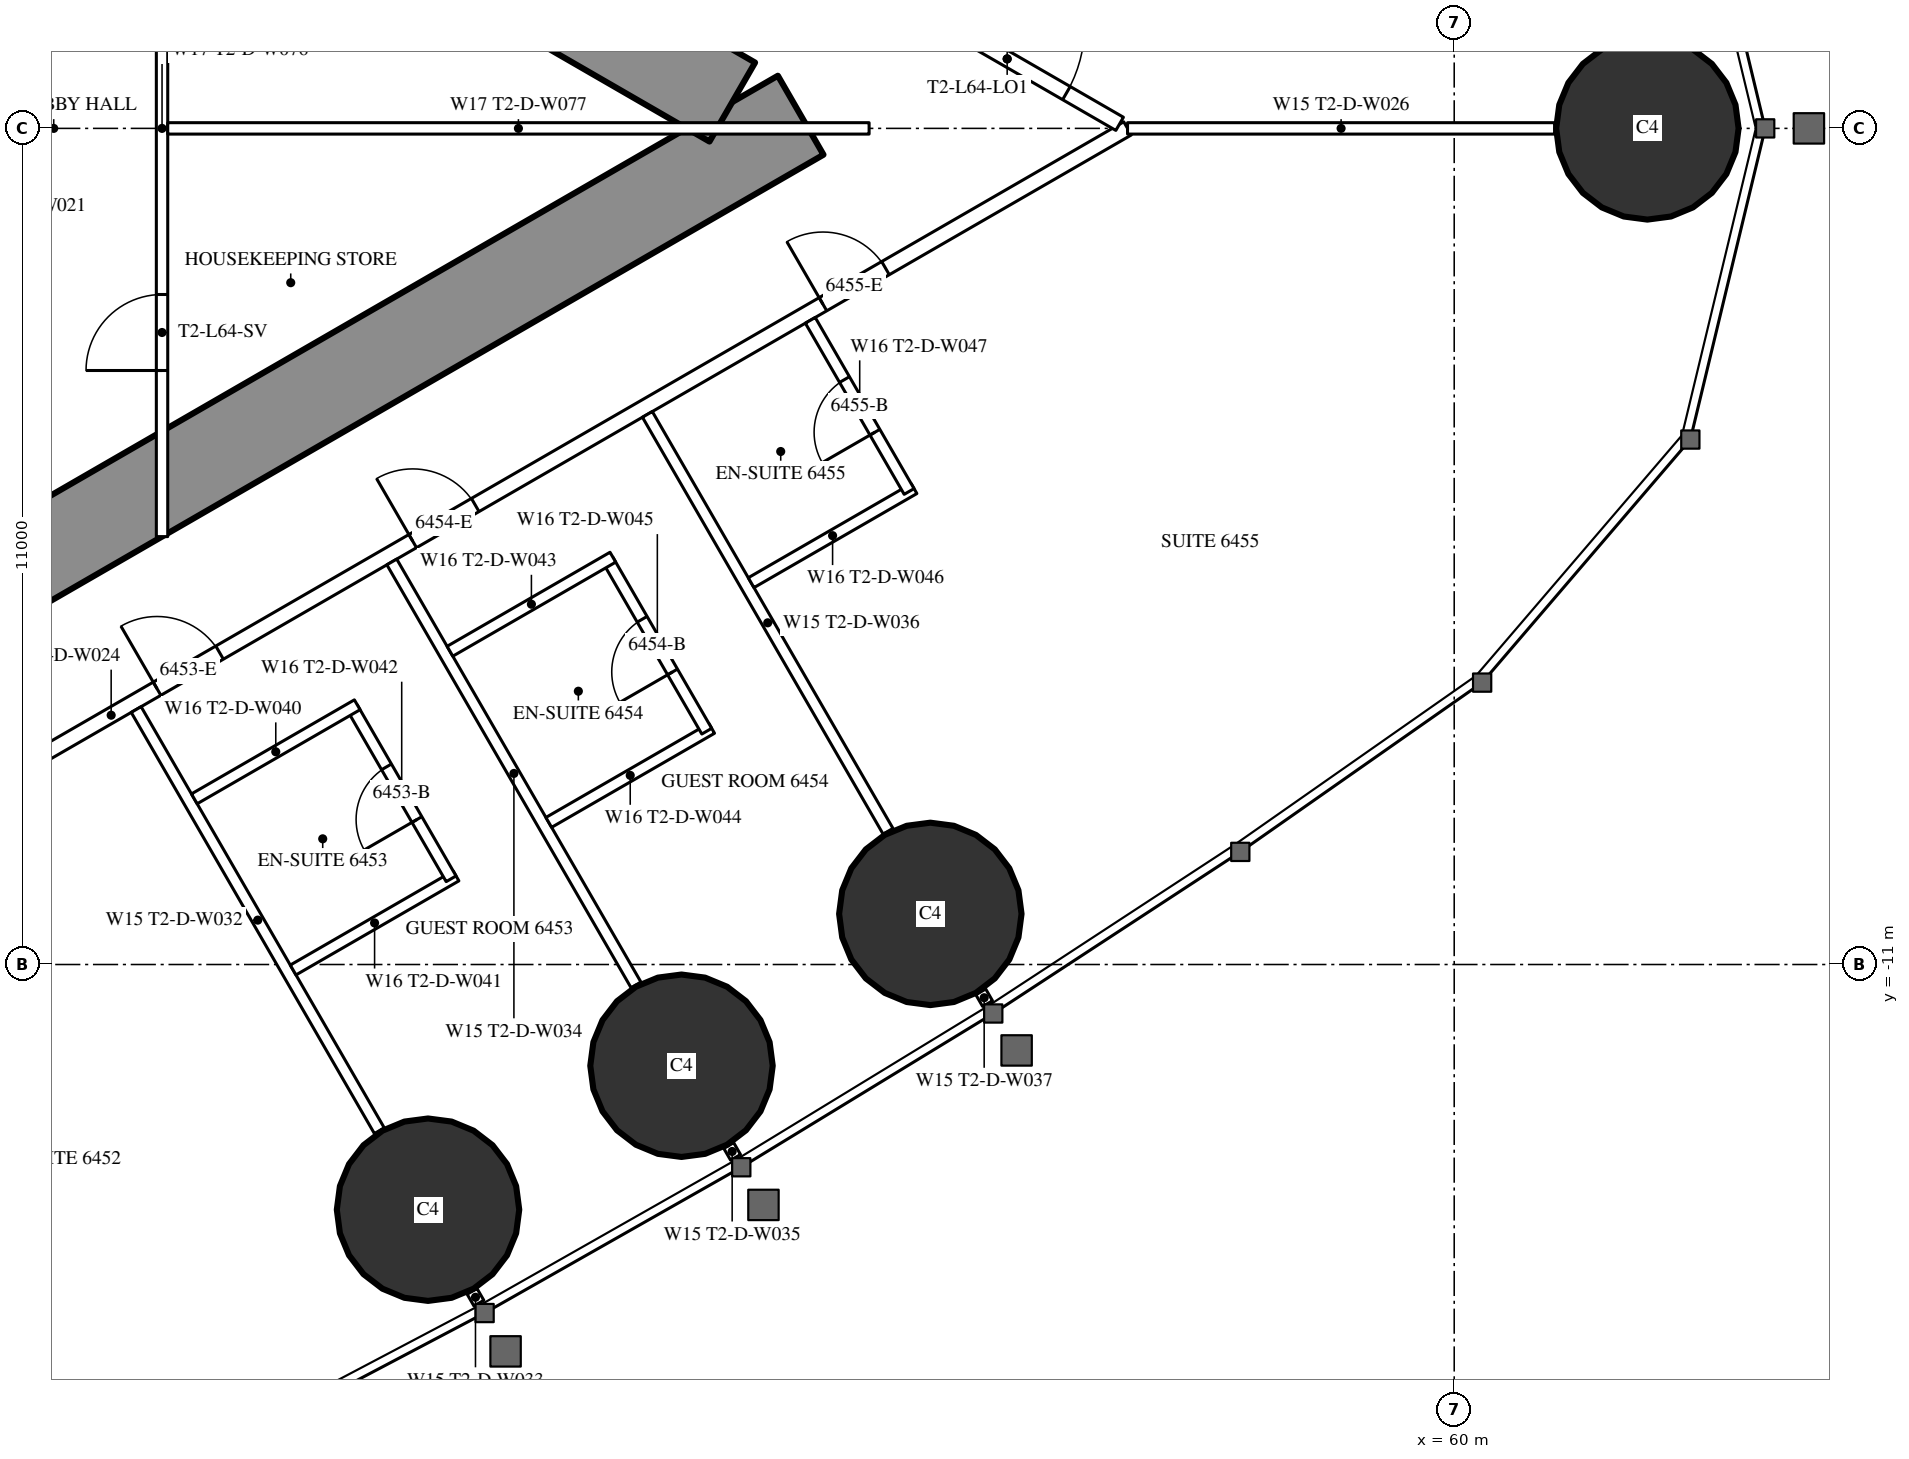
"""IFC4 building model, lengths in metres.
Left out: names, types, materials, properties, quantities, classifications, styles, units other than length and angle.
Written with IfcOpenShell. Run it as: python <this file> out.ifc"""

import sys

from ifc_helpers import new_model, si_unit, direction, frame, frame_2d, origin, origin_2d, place, context, subcontext, project, spatial, rectangle, circle, extrude, element, fill, save


model = new_model("IFC4")
c1 = context("Model", 3, precision=1e-05, world=origin(), true_north=direction((0.0, 1.0)))
c2 = subcontext(c1, "Body", "Model", "MODEL_VIEW")
j1 = project(units=[si_unit("LENGTHUNIT", "METRE"), si_unit("PLANEANGLEUNIT", "RADIAN")], contexts=[c1])
p1 = place(None, origin())
s1 = spatial("IfcSite", under=j1, at=p1, CompositionType="ELEMENT")
p2 = place(p1, origin())
s2 = spatial("IfcBuilding", under=s1, at=p2, CompositionType="ELEMENT")
p3 = place(p2, frame((0.0, 0.0, 240.5)))
s3 = spatial("IfcBuildingStorey", under=s2, at=p3, CompositionType="ELEMENT", Elevation=240.5)
for number, where, z_axis, x_axis in (
    (1, (62.542, 0.0, 0.0), (0.0, 0.0, 1.0), (1.0, 0.0, 0.0)),
    (2, (46.499, -14.226, 0.0), (0.0, 0.0, 1.0), (1.0, 0.0, 0.0)),
    (3, (49.834, -12.332, 0.0), (0.0, 0.0, 1.0), (1.0, 0.0, 0.0)),
    (4, (53.108, -10.334, 0.0), (0.0, 0.0, 1.0), (1.0, 0.0, 0.0)),
):
    element("IfcColumn", number, at=place(p3, frame(where, z_axis=z_axis, x_axis=x_axis)), inside=s3, PredefinedType="COLUMN", context=c2, shape_type="SweptSolid", body=[
        extrude(circle(Radius=1.2, at=origin_2d()), origin(), (0.0, 0.0, 1.0), 3.6),
    ])
p4 = place(p3, frame((27.2, -13.8, 0.0), z_axis=(0.0, 0.0, 1.0), x_axis=(0.866027159892, 0.499996958321, 0.0)))
e5 = element("IfcWall", 5, at=p4, inside=s3, PredefinedType="SHEAR", context=c2, shape_type="SweptSolid", body=[
    extrude(rectangle(XDim=27.947, YDim=1.2, at=frame_2d((13.973, 0.0))), origin(), (0.0, 0.0, 1.0), 3.6),
])
p5 = place(p4, frame((4.6, 0.0, 0.0)))
e6 = element("IfcOpeningElement", 6, at=p5, cuts=e5, PredefinedType="OPENING", context=c2, shape_type="SweptSolid", body=[
    extrude(rectangle(XDim=1.0, YDim=2.2, at=frame_2d((0.5, 1.1))), frame((0.0, 0.61, 0.0), z_axis=(0.0, -1.0, 0.0), x_axis=(1.0, 0.0, 0.0)), (0.0, 0.0, 1.0), 1.22),
])
p6 = place(p4, frame((13.395, 0.0, 0.0)))
e7 = element("IfcOpeningElement", 7, at=p6, cuts=e5, PredefinedType="OPENING", context=c2, shape_type="SweptSolid", body=[
    extrude(rectangle(XDim=1.8, YDim=2.2, at=frame_2d((0.9, 1.1))), frame((0.0, 0.61, 0.0), z_axis=(0.0, -1.0, 0.0), x_axis=(1.0, 0.0, 0.0)), (0.0, 0.0, 1.0), 1.22),
])
p7 = place(p3, frame((27.2, 13.8, 0.0), z_axis=(0.0, 0.0, 1.0), x_axis=(0.866024515034, -0.500001539357, 0.0)))
e8 = element("IfcWall", 8, at=p7, inside=s3, PredefinedType="SHEAR", context=c2, shape_type="SweptSolid", body=[
    extrude(rectangle(XDim=26.907, YDim=1.2, at=frame_2d((13.454, 0.0))), origin(), (0.0, 0.0, 1.0), 3.6),
])
p8 = place(p7, frame((4.6, 0.0, 0.0)))
e9 = element("IfcOpeningElement", 9, at=p8, cuts=e8, PredefinedType="OPENING", context=c2, shape_type="SweptSolid", body=[
    extrude(rectangle(XDim=1.0, YDim=2.2, at=frame_2d((0.5, 1.1))), frame((0.0, 0.61, 0.0), z_axis=(0.0, -1.0, 0.0), x_axis=(1.0, 0.0, 0.0)), (0.0, 0.0, 1.0), 1.22),
])
p9 = place(p7, frame((13.395, 0.0, 0.0)))
e10 = element("IfcOpeningElement", 10, at=p9, cuts=e8, PredefinedType="OPENING", context=c2, shape_type="SweptSolid", body=[
    extrude(rectangle(XDim=1.8, YDim=2.2, at=frame_2d((0.9, 1.1))), frame((0.0, 0.61, 0.0), z_axis=(0.0, -1.0, 0.0), x_axis=(1.0, 0.0, 0.0)), (0.0, 0.0, 1.0), 1.22),
])
p10 = place(p3, frame((28.959, -15.44, 0.0), z_axis=(0.0, 0.0, 1.0), x_axis=(0.866025227435, 0.500000305447, 0.0)))
e11 = element("IfcWall", 11, at=p10, inside=s3, PredefinedType="PARTITIONING", context=c2, shape_type="SweptSolid", body=[
    extrude(rectangle(XDim=30.88, YDim=0.2, at=frame_2d((15.44, 0.0))), origin(), (0.0, 0.0, 1.0), 3.35),
])
p11 = place(p10, frame((1.494, 0.0, 0.0)))
e12 = element("IfcOpeningElement", 12, at=p11, cuts=e11, PredefinedType="OPENING", context=c2, shape_type="SweptSolid", body=[
    extrude(rectangle(XDim=1.8, YDim=2.03, at=frame_2d((0.9, 1.015))), frame((0.0, 0.11, 0.0), z_axis=(0.0, -1.0, 0.0), x_axis=(1.0, 0.0, 0.0)), (0.0, 0.0, 1.0), 0.22),
])
p12 = place(p10, frame((7.687, 0.0, 0.0)))
e13 = element("IfcOpeningElement", 13, at=p12, cuts=e11, PredefinedType="OPENING", context=c2, shape_type="SweptSolid", body=[
    extrude(rectangle(XDim=1.0, YDim=2.2, at=frame_2d((0.5, 1.1))), frame((0.0, 0.11, 0.0), z_axis=(0.0, -1.0, 0.0), x_axis=(1.0, 0.0, 0.0)), (0.0, 0.0, 1.0), 0.22),
])
p13 = place(p10, frame((16.137, 0.0, 0.0)))
e14 = element("IfcOpeningElement", 14, at=p13, cuts=e11, PredefinedType="OPENING", context=c2, shape_type="SweptSolid", body=[
    extrude(rectangle(XDim=0.95, YDim=2.2, at=frame_2d((0.475, 1.1))), frame((0.0, 0.11, 0.0), z_axis=(0.0, -1.0, 0.0), x_axis=(1.0, 0.0, 0.0)), (0.0, 0.0, 1.0), 0.22),
])
p14 = place(p10, frame((20.021, 0.0, 0.0)))
e15 = element("IfcOpeningElement", 15, at=p14, cuts=e11, PredefinedType="OPENING", context=c2, shape_type="SweptSolid", body=[
    extrude(rectangle(XDim=0.95, YDim=2.2, at=frame_2d((0.475, 1.1))), frame((0.0, 0.11, 0.0), z_axis=(0.0, -1.0, 0.0), x_axis=(1.0, 0.0, 0.0)), (0.0, 0.0, 1.0), 0.22),
])
p15 = place(p10, frame((26.253, 0.0, 0.0)))
e16 = element("IfcOpeningElement", 16, at=p15, cuts=e11, PredefinedType="OPENING", context=c2, shape_type="SweptSolid", body=[
    extrude(rectangle(XDim=0.95, YDim=2.2, at=frame_2d((0.475, 1.1))), frame((0.0, 0.11, 0.0), z_axis=(0.0, -1.0, 0.0), x_axis=(1.0, 0.0, 0.0)), (0.0, 0.0, 1.0), 0.22),
])
p16 = place(p3, frame((42.66, -7.646, 0.0), z_axis=(0.0, 0.0, 1.0), x_axis=(0.499996592859, -0.866027370889, 0.0)))
e17 = element("IfcWall", 17, at=p16, inside=s3, PredefinedType="PARTITIONING", context=c2, shape_type="SweptSolid", body=[
    extrude(rectangle(XDim=6.398, YDim=0.15, at=frame_2d((3.199, 0.0))), origin(), (0.0, 0.0, 1.0), 2.45),
])
p17 = place(p3, frame((47.079, -15.3, 0.0), z_axis=(0.0, 0.0, 1.0), x_axis=(0.499212083968, -0.866479829667, 0.0)))
e18 = element("IfcWall", 18, at=p17, inside=s3, PredefinedType="PARTITIONING", context=c2, shape_type="SweptSolid", body=[
    extrude(rectangle(XDim=0.179, YDim=0.15, at=frame_2d((0.09, 0.0))), origin(), (0.0, 0.0, 1.0), 2.45),
])
p18 = place(p3, frame((46.023, -5.704, 0.0), z_axis=(0.0, 0.0, 1.0), x_axis=(0.499984478165, -0.866034365135, 0.0)))
e19 = element("IfcWall", 19, at=p18, inside=s3, PredefinedType="PARTITIONING", context=c2, shape_type="SweptSolid", body=[
    extrude(rectangle(XDim=6.426, YDim=0.15, at=frame_2d((3.213, 0.0))), origin(), (0.0, 0.0, 1.0), 2.45),
])
p19 = place(p3, frame((50.456, -13.382, 0.0), z_axis=(0.0, 0.0, 1.0), x_axis=(0.500661834965, -0.865642955848, 0.0)))
e20 = element("IfcWall", 20, at=p19, inside=s3, PredefinedType="PARTITIONING", context=c2, shape_type="SweptSolid", body=[
    extrude(rectangle(XDim=0.18, YDim=0.15, at=frame_2d((0.09, 0.0))), origin(), (0.0, 0.0, 1.0), 2.45),
])
p20 = place(p3, frame((49.385, -3.763, 0.0), z_axis=(0.0, 0.0, 1.0), x_axis=(0.499999447814, -0.866025722589, 0.0)))
e21 = element("IfcWall", 21, at=p20, inside=s3, PredefinedType="PARTITIONING", context=c2, shape_type="SweptSolid", body=[
    extrude(rectangle(XDim=6.333, YDim=0.15, at=frame_2d((3.166, 0.0))), origin(), (0.0, 0.0, 1.0), 2.45),
])
p21 = place(p3, frame((53.771, -11.36, 0.0), z_axis=(0.0, 0.0, 1.0), x_axis=(0.499524978789, -0.866299483762, 0.0)))
e22 = element("IfcWall", 22, at=p21, inside=s3, PredefinedType="PARTITIONING", context=c2, shape_type="SweptSolid", body=[
    extrude(rectangle(XDim=0.178, YDim=0.15, at=frame_2d((0.089, 0.0))), origin(), (0.0, 0.0, 1.0), 2.45),
])
p22 = place(p3, frame((55.702, 0.0, 0.0), z_axis=(0.0, 0.0, 1.0), x_axis=(1.0, 0.0, 0.0)))
e23 = element("IfcWall", 23, at=p22, inside=s3, PredefinedType="PARTITIONING", context=c2, shape_type="SweptSolid", body=[
    extrude(rectangle(XDim=5.619, YDim=0.15, at=frame_2d((2.81, 0.0))), origin(), (0.0, 0.0, 1.0), 2.45),
])
p23 = place(p3, frame((52.639, 1.769, 0.0), z_axis=(0.0, 0.0, 1.0), x_axis=(0.866027340901, -0.4999966448, 0.0)))
e24 = element("IfcWall", 24, at=p23, inside=s3, PredefinedType="PARTITIONING", context=c2, shape_type="SweptSolid", body=[
    extrude(rectangle(XDim=3.417, YDim=0.2, at=frame_2d((1.708, 0.0))), origin(), (0.0, 0.0, 1.0), 3.35),
])
p24 = place(p23, frame((0.809, 0.0, 0.0)))
e25 = element("IfcOpeningElement", 25, at=p24, cuts=e24, PredefinedType="OPENING", context=c2, shape_type="SweptSolid", body=[
    extrude(rectangle(XDim=1.8, YDim=2.2, at=frame_2d((0.9, 1.1))), frame((0.0, 0.11, 0.0), z_axis=(0.0, -1.0, 0.0), x_axis=(1.0, 0.0, 0.0)), (0.0, 0.0, 1.0), 0.22),
])
p25 = place(p3, frame((44.725, -11.072, 0.0), z_axis=(0.0, 0.0, 1.0), x_axis=(0.866006523861, 0.500032699561, 0.0)))
e26 = element("IfcWall", 26, at=p25, inside=s3, PredefinedType="PARTITIONING", context=c2, shape_type="SweptSolid", body=[
    extrude(rectangle(XDim=2.475, YDim=0.15, at=frame_2d((1.237, 0.0))), origin(), (0.0, 0.0, 1.0), 3.35),
])
p26 = place(p3, frame((45.503, -7.621, 0.0), z_axis=(0.0, 0.0, 1.0), x_axis=(0.500006934395, -0.866021400173, 0.0)))
e27 = element("IfcWall", 27, at=p26, inside=s3, PredefinedType="PARTITIONING", context=c2, shape_type="SweptSolid", body=[
    extrude(rectangle(XDim=2.6, YDim=0.15, at=frame_2d((1.3, 0.0))), origin(), (0.0, 0.0, 1.0), 3.35),
])
p27 = place(p26, frame((0.9, 0.0, 0.0)))
e28 = element("IfcOpeningElement", 28, at=p27, cuts=e27, PredefinedType="OPENING", context=c2, shape_type="SweptSolid", body=[
    extrude(rectangle(XDim=0.8, YDim=2.2, at=frame_2d((0.4, 1.1))), frame((0.0, 0.085, 0.0), z_axis=(0.0, -1.0, 0.0), x_axis=(1.0, 0.0, 0.0)), (0.0, 0.0, 1.0), 0.17),
])
for number, where, z_axis, x_axis in (
    (29, (43.425, -8.821, 0.0), (0.0, 0.0, 1.0), (0.866, 0.5, 0.0)),
    (30, (48.088, -9.13, 0.0), (0.0, 0.0, 1.0), (0.866, 0.5, 0.0)),
):
    element("IfcWall", number, at=place(p3, frame(where, z_axis=z_axis, x_axis=x_axis)), inside=s3, PredefinedType="PARTITIONING", context=c2, shape_type="SweptSolid", body=[
        extrude(rectangle(XDim=2.475, YDim=0.15, at=frame_2d((1.237, 0.0))), origin(), (0.0, 0.0, 1.0), 3.35),
    ])
p28 = place(p3, frame((48.866, -5.679, 0.0), z_axis=(0.0, 0.0, 1.0), x_axis=(0.500006934395, -0.866021400173, 0.0)))
e31 = element("IfcWall", 31, at=p28, inside=s3, PredefinedType="PARTITIONING", context=c2, shape_type="SweptSolid", body=[
    extrude(rectangle(XDim=2.6, YDim=0.15, at=frame_2d((1.3, 0.0))), origin(), (0.0, 0.0, 1.0), 3.35),
])
p29 = place(p28, frame((0.9, 0.0, 0.0)))
e32 = element("IfcOpeningElement", 32, at=p29, cuts=e31, PredefinedType="OPENING", context=c2, shape_type="SweptSolid", body=[
    extrude(rectangle(XDim=0.8, YDim=2.2, at=frame_2d((0.4, 1.1))), frame((0.0, 0.085, 0.0), z_axis=(0.0, -1.0, 0.0), x_axis=(1.0, 0.0, 0.0)), (0.0, 0.0, 1.0), 0.17),
])
p30 = place(p3, frame((46.788, -6.879, 0.0), z_axis=(0.0, 0.0, 1.0), x_axis=(0.866006523861, 0.500032699561, 0.0)))
e33 = element("IfcWall", 33, at=p30, inside=s3, PredefinedType="PARTITIONING", context=c2, shape_type="SweptSolid", body=[
    extrude(rectangle(XDim=2.475, YDim=0.15, at=frame_2d((1.237, 0.0))), origin(), (0.0, 0.0, 1.0), 3.35),
])
p31 = place(p3, frame((50.75, -5.977, 0.0), z_axis=(0.0, 0.0, 1.0), x_axis=(0.866031185235, 0.4999899861, 0.0)))
e34 = element("IfcWall", 34, at=p31, inside=s3, PredefinedType="PARTITIONING", context=c2, shape_type="SweptSolid", body=[
    extrude(rectangle(XDim=2.475, YDim=0.15, at=frame_2d((1.238, 0.0))), origin(), (0.0, 0.0, 1.0), 3.35),
])
p32 = place(p3, frame((51.529, -2.525, 0.0), z_axis=(0.0, 0.0, 1.0), x_axis=(0.500006934395, -0.866021400173, 0.0)))
e35 = element("IfcWall", 35, at=p32, inside=s3, PredefinedType="PARTITIONING", context=c2, shape_type="SweptSolid", body=[
    extrude(rectangle(XDim=2.6, YDim=0.15, at=frame_2d((1.3, 0.0))), origin(), (0.0, 0.0, 1.0), 3.35),
])
p33 = place(p32, frame((0.9, 0.0, 0.0)))
e36 = element("IfcOpeningElement", 36, at=p33, cuts=e35, PredefinedType="OPENING", context=c2, shape_type="SweptSolid", body=[
    extrude(rectangle(XDim=0.8, YDim=2.2, at=frame_2d((0.4, 1.1))), frame((0.0, 0.085, 0.0), z_axis=(0.0, -1.0, 0.0), x_axis=(1.0, 0.0, 0.0)), (0.0, 0.0, 1.0), 0.17),
])
p34 = place(p3, frame((43.0, -5.371, 0.0), z_axis=(0.0, 0.0, 1.0), x_axis=(0.0, 1.0, 0.0)))
e37 = element("IfcWall", 37, at=p34, inside=s3, PredefinedType="PARTITIONING", context=c2, shape_type="SweptSolid", body=[
    extrude(rectangle(XDim=10.741, YDim=0.15, at=frame_2d((5.371, 0.0))), origin(), (0.0, 0.0, 1.0), 3.35),
])
p35 = place(p34, frame((2.185, 0.0, 0.0)))
e38 = element("IfcOpeningElement", 38, at=p35, cuts=e37, PredefinedType="OPENING", context=c2, shape_type="SweptSolid", body=[
    extrude(rectangle(XDim=1.0, YDim=2.2, at=frame_2d((0.5, 1.1))), frame((0.0, 0.085, 0.0), z_axis=(0.0, -1.0, 0.0), x_axis=(1.0, 0.0, 0.0)), (0.0, 0.0, 1.0), 0.17),
])
p36 = place(p34, frame((7.556, 0.0, 0.0)))
e39 = element("IfcOpeningElement", 39, at=p36, cuts=e37, PredefinedType="OPENING", context=c2, shape_type="SweptSolid", body=[
    extrude(rectangle(XDim=1.0, YDim=2.2, at=frame_2d((0.5, 1.1))), frame((0.0, 0.085, 0.0), z_axis=(0.0, -1.0, 0.0), x_axis=(1.0, 0.0, 0.0)), (0.0, 0.0, 1.0), 0.17),
])
p37 = place(p3, frame((43.075, 0.0, 0.0), z_axis=(0.0, 0.0, 1.0), x_axis=(1.0, 0.0, 0.0)))
e40 = element("IfcWall", 40, at=p37, inside=s3, PredefinedType="PARTITIONING", context=c2, shape_type="SweptSolid", body=[
    extrude(rectangle(XDim=9.227, YDim=0.15, at=frame_2d((4.614, 0.0))), origin(), (0.0, 0.0, 1.0), 2.45),
])
p38 = place(p27, origin())
e41 = element("IfcDoor", 41, at=p38, inside=s3, OperationType="SINGLE_SWING_RIGHT", PredefinedType="DOOR", context=c2, shape_type="SweptSolid", body=[
    extrude(rectangle(XDim=0.8, YDim=2.2, at=frame_2d((0.4, 1.1))), frame((0.0, 0.025, 0.0), z_axis=(0.0, -1.0, 0.0), x_axis=(1.0, 0.0, 0.0)), (0.0, 0.0, 1.0), 0.05),
])
fill(e28, e41)
p39 = place(p13, origin())
e42 = element("IfcDoor", 42, at=p39, inside=s3, OperationType="SINGLE_SWING_LEFT", PredefinedType="DOOR", context=c2, shape_type="SweptSolid", body=[
    extrude(rectangle(XDim=0.95, YDim=2.2, at=frame_2d((0.475, 1.1))), frame((0.0, 0.025, 0.0), z_axis=(0.0, -1.0, 0.0), x_axis=(1.0, 0.0, 0.0)), (0.0, 0.0, 1.0), 0.05),
])
fill(e14, e42)
p40 = place(p29, origin())
e43 = element("IfcDoor", 43, at=p40, inside=s3, OperationType="SINGLE_SWING_RIGHT", PredefinedType="DOOR", context=c2, shape_type="SweptSolid", body=[
    extrude(rectangle(XDim=0.8, YDim=2.2, at=frame_2d((0.4, 1.1))), frame((0.0, 0.025, 0.0), z_axis=(0.0, -1.0, 0.0), x_axis=(1.0, 0.0, 0.0)), (0.0, 0.0, 1.0), 0.05),
])
fill(e32, e43)
p41 = place(p14, origin())
e44 = element("IfcDoor", 44, at=p41, inside=s3, OperationType="SINGLE_SWING_LEFT", PredefinedType="DOOR", context=c2, shape_type="SweptSolid", body=[
    extrude(rectangle(XDim=0.95, YDim=2.2, at=frame_2d((0.475, 1.1))), frame((0.0, 0.025, 0.0), z_axis=(0.0, -1.0, 0.0), x_axis=(1.0, 0.0, 0.0)), (0.0, 0.0, 1.0), 0.05),
])
fill(e15, e44)
p42 = place(p33, origin())
e45 = element("IfcDoor", 45, at=p42, inside=s3, OperationType="SINGLE_SWING_RIGHT", PredefinedType="DOOR", context=c2, shape_type="SweptSolid", body=[
    extrude(rectangle(XDim=0.8, YDim=2.2, at=frame_2d((0.4, 1.1))), frame((0.0, 0.025, 0.0), z_axis=(0.0, -1.0, 0.0), x_axis=(1.0, 0.0, 0.0)), (0.0, 0.0, 1.0), 0.05),
])
fill(e36, e45)
p43 = place(p15, origin())
e46 = element("IfcDoor", 46, at=p43, inside=s3, OperationType="SINGLE_SWING_LEFT", PredefinedType="DOOR", context=c2, shape_type="SweptSolid", body=[
    extrude(rectangle(XDim=0.95, YDim=2.2, at=frame_2d((0.475, 1.1))), frame((0.0, 0.025, 0.0), z_axis=(0.0, -1.0, 0.0), x_axis=(1.0, 0.0, 0.0)), (0.0, 0.0, 1.0), 0.05),
])
fill(e16, e46)
p44 = place(p24, origin())
e47 = element("IfcDoor", 47, at=p44, inside=s3, OperationType="DOUBLE_DOOR_SINGLE_SWING", PredefinedType="DOOR", context=c2, shape_type="SweptSolid", body=[
    extrude(rectangle(XDim=1.8, YDim=2.2, at=frame_2d((0.9, 1.1))), frame((0.0, 0.025, 0.0), z_axis=(0.0, -1.0, 0.0), x_axis=(1.0, 0.0, 0.0)), (0.0, 0.0, 1.0), 0.05),
])
fill(e25, e47)
p45 = place(p35, origin())
e48 = element("IfcDoor", 48, at=p45, inside=s3, OperationType="SINGLE_SWING_LEFT", PredefinedType="DOOR", context=c2, shape_type="SweptSolid", body=[
    extrude(rectangle(XDim=1.0, YDim=2.2, at=frame_2d((0.5, 1.1))), frame((0.0, 0.025, 0.0), z_axis=(0.0, -1.0, 0.0), x_axis=(1.0, 0.0, 0.0)), (0.0, 0.0, 1.0), 0.05),
])
fill(e38, e48)
save(model, sys.argv[1])
